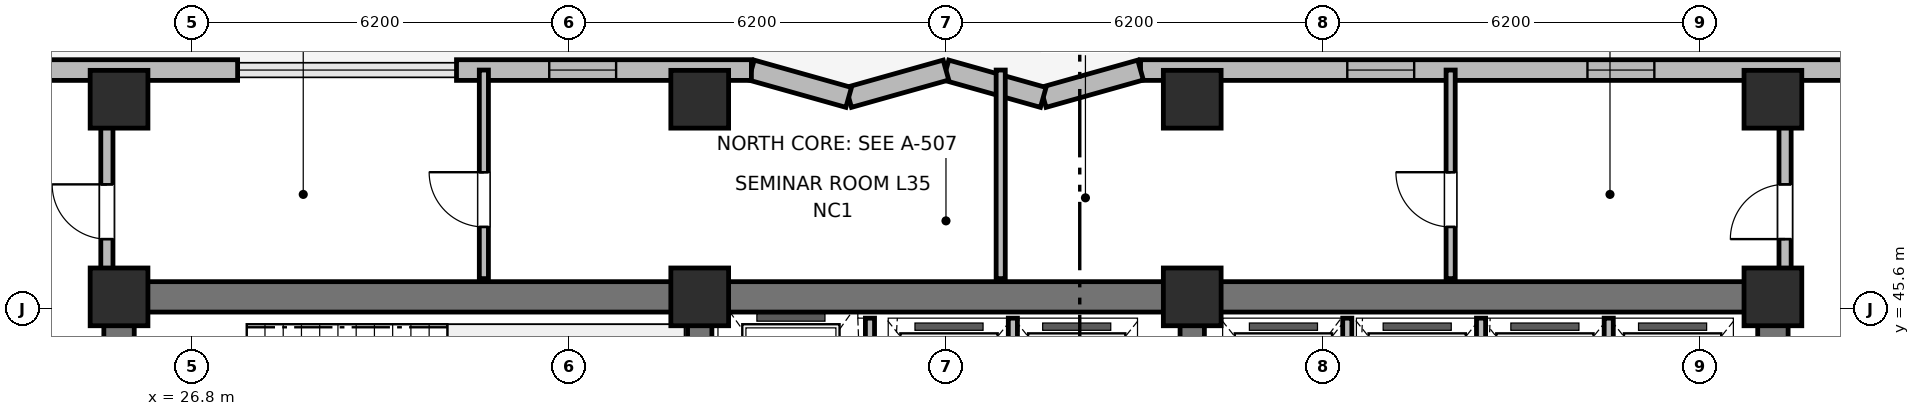
"""IFC4 building model, lengths in metres.
Left out: names, types, materials, properties, quantities, classifications, styles, units other than length and angle.
Written with IfcOpenShell. Run it as: python <this file> out.ifc"""

import sys

from ifc_helpers import new_model, si_unit, direction, frame, frame_2d, origin, origin_2d, place, context, subcontext, project, spatial, rectangle, extrude, element, fill, save


model = new_model("IFC4")
c1 = context("Model", 3, precision=1e-05, world=origin(), true_north=direction((0.0, 1.0)))
c2 = subcontext(c1, "Body", "Model", "MODEL_VIEW")
j1 = project(units=[si_unit("LENGTHUNIT", "METRE"), si_unit("PLANEANGLEUNIT", "RADIAN")], contexts=[c1])
p1 = place(None, origin())
s1 = spatial("IfcSite", under=j1, at=p1, CompositionType="ELEMENT")
p2 = place(p1, origin())
s2 = spatial("IfcBuilding", under=s1, at=p2, CompositionType="ELEMENT")
p3 = place(p2, frame((0.0, 0.0, 143.6)))
s3 = spatial("IfcBuildingStorey", under=s2, at=p3, CompositionType="ELEMENT", Elevation=143.6)
p4 = place(p3, frame((25.6, 45.8, 0.0), z_axis=(0.0, 0.0, 1.0), x_axis=(1.0, 0.0, 0.0)))
e1 = element("IfcWall", 1, at=p4, inside=s3, PredefinedType="SHEAR", context=c2, shape_type="SweptSolid", body=[
    extrude(rectangle(XDim=27.2, YDim=0.5, at=frame_2d((13.6, 0.0))), origin(), (0.0, 0.0, 1.0), 4.2),
])
for number, where, z_axis, x_axis in (
    (2, (25.6, 39.85, 0.0), (0.0, 0.0, 1.0), (0.0, 1.0, 0.0)),
    (3, (52.8, 39.85, 0.0), (0.0, 0.0, 1.0), (0.0, 1.0, 0.0)),
):
    element("IfcWall", number, at=place(p3, frame(where, z_axis=z_axis, x_axis=x_axis)), inside=s3, PredefinedType="SHEAR", context=c2, shape_type="SweptSolid", body=[
        extrude(rectangle(XDim=5.7, YDim=0.5, at=frame_2d((2.85, 0.0))), origin(), (0.0, 0.0, 1.0), 4.2),
    ])
for number, where, z_axis, x_axis in (
    (4, (35.15, 39.85, 0.0), (0.0, 0.0, 1.0), (0.0, 1.0, 0.0)),
    (5, (43.25, 39.85, 0.0), (0.0, 0.0, 1.0), (0.0, 1.0, 0.0)),
):
    element("IfcWall", number, at=place(p3, frame(where, z_axis=z_axis, x_axis=x_axis)), inside=s3, PredefinedType="SHEAR", context=c2, shape_type="SweptSolid", body=[
        extrude(rectangle(XDim=5.7, YDim=0.4, at=frame_2d((2.85, 0.0))), origin(), (0.0, 0.0, 1.0), 4.2),
    ])
for number, where, z_axis, x_axis in (
    (6, (25.6, 45.8, 0.0), (0.0, 0.0, 1.0), (1.0, 0.0, 0.0)),
    (7, (35.15, 45.8, 0.0), (0.0, 0.0, 1.0), (1.0, 0.0, 0.0)),
    (8, (43.25, 45.8, 0.0), (0.0, 0.0, 1.0), (1.0, 0.0, 0.0)),
    (9, (52.8, 45.8, 0.0), (0.0, 0.0, 1.0), (1.0, 0.0, 0.0)),
    (10, (25.6, 49.05, 0.0), (0.0, 0.0, 1.0), (1.0, 0.0, 0.0)),
    (11, (35.15, 49.05, 0.0), (0.0, 0.0, 1.0), (1.0, 0.0, 0.0)),
    (12, (43.25, 49.05, 0.0), (0.0, 0.0, 1.0), (1.0, 0.0, 0.0)),
    (13, (52.8, 49.05, 0.0), (0.0, 0.0, 1.0), (1.0, 0.0, 0.0)),
):
    element("IfcColumn", number, at=place(p3, frame(where, z_axis=z_axis, x_axis=x_axis)), inside=s3, PredefinedType="COLUMN", context=c2, shape_type="SweptSolid", body=[
        extrude(rectangle(XDim=0.95, YDim=0.95, at=origin_2d()), origin(), (0.0, 0.0, 1.0), 4.2),
    ])
p5 = place(p3, frame((58.2, 49.53, 0.0), z_axis=(0.0, 0.0, 1.0), x_axis=(-1.0, 0.0, 0.0)))
e14 = element("IfcWall", 14, at=p5, inside=s3, PredefinedType="SOLIDWALL", context=c2, shape_type="SweptSolid", body=[
    extrude(rectangle(XDim=15.8, YDim=0.34, at=frame_2d((7.9, 0.0))), origin(), (0.0, 0.0, 1.0), 3.22),
])
p6 = place(p5, frame((0.85, 0.0, 0.95)))
e15 = element("IfcOpeningElement", 15, at=p6, cuts=e14, PredefinedType="OPENING", context=c2, shape_type="SweptSolid", body=[
    extrude(rectangle(XDim=1.1, YDim=1.65, at=frame_2d((0.55, 0.825))), frame((0.0, 0.18, 0.0), z_axis=(0.0, -1.0, 0.0), x_axis=(1.0, 0.0, 0.0)), (0.0, 0.0, 1.0), 0.36),
])
p7 = place(p5, frame((7.35, 0.0, 0.95)))
e16 = element("IfcOpeningElement", 16, at=p7, cuts=e14, PredefinedType="OPENING", context=c2, shape_type="SweptSolid", body=[
    extrude(rectangle(XDim=1.1, YDim=1.65, at=frame_2d((0.55, 0.825))), frame((0.0, 0.18, 0.0), z_axis=(0.0, -1.0, 0.0), x_axis=(1.0, 0.0, 0.0)), (0.0, 0.0, 1.0), 0.36),
])
p8 = place(p5, frame((11.3, 0.0, 0.95)))
e17 = element("IfcOpeningElement", 17, at=p8, cuts=e14, PredefinedType="OPENING", context=c2, shape_type="SweptSolid", body=[
    extrude(rectangle(XDim=1.1, YDim=1.65, at=frame_2d((0.55, 0.825))), frame((0.0, 0.18, 0.0), z_axis=(0.0, -1.0, 0.0), x_axis=(1.0, 0.0, 0.0)), (0.0, 0.0, 1.0), 0.36),
])
p9 = place(p3, frame((42.4, 49.53, 0.0), z_axis=(0.0, 0.0, 1.0), x_axis=(-0.962652136636, -0.270741322725, 0.0)))
e18 = element("IfcWall", 18, at=p9, inside=s3, PredefinedType="SOLIDWALL", context=c2, shape_type="SweptSolid", body=[
    extrude(rectangle(XDim=1.662, YDim=0.34, at=frame_2d((0.831, 0.0))), origin(), (0.0, 0.0, 1.0), 3.22),
])
p10 = place(p3, frame((40.8, 49.08, 0.0), z_axis=(0.0, 0.0, 1.0), x_axis=(-0.962662902433, 0.270703040766, 0.0)))
e19 = element("IfcWall", 19, at=p10, inside=s3, PredefinedType="SOLIDWALL", context=c2, shape_type="SweptSolid", body=[
    extrude(rectangle(XDim=1.662, YDim=0.34, at=frame_2d((0.831, 0.0))), origin(), (0.0, 0.0, 1.0), 3.22),
])
p11 = place(p3, frame((39.2, 49.53, 0.0), z_axis=(0.0, 0.0, 1.0), x_axis=(-0.962652136636, -0.270741322725, 0.0)))
e20 = element("IfcWall", 20, at=p11, inside=s3, PredefinedType="SOLIDWALL", context=c2, shape_type="SweptSolid", body=[
    extrude(rectangle(XDim=1.662, YDim=0.34, at=frame_2d((0.831, 0.0))), origin(), (0.0, 0.0, 1.0), 3.22),
])
p12 = place(p3, frame((37.6, 49.08, 0.0), z_axis=(0.0, 0.0, 1.0), x_axis=(-0.962662902433, 0.270703040766, 0.0)))
e21 = element("IfcWall", 21, at=p12, inside=s3, PredefinedType="SOLIDWALL", context=c2, shape_type="SweptSolid", body=[
    extrude(rectangle(XDim=1.662, YDim=0.34, at=frame_2d((0.831, 0.0))), origin(), (0.0, 0.0, 1.0), 3.22),
])
p13 = place(p3, frame((36.0, 49.53, 0.0), z_axis=(0.0, 0.0, 1.0), x_axis=(-1.0, 0.0, 0.0)))
e22 = element("IfcWall", 22, at=p13, inside=s3, PredefinedType="SOLIDWALL", context=c2, shape_type="SweptSolid", body=[
    extrude(rectangle(XDim=4.85, YDim=0.34, at=frame_2d((2.425, 0.0))), origin(), (0.0, 0.0, 1.0), 3.22),
])
p14 = place(p13, frame((2.225, 0.0, 0.95)))
e23 = element("IfcOpeningElement", 23, at=p14, cuts=e22, PredefinedType="OPENING", context=c2, shape_type="SweptSolid", body=[
    extrude(rectangle(XDim=1.1, YDim=1.65, at=frame_2d((0.55, 0.825))), frame((0.0, 0.18, 0.0), z_axis=(0.0, -1.0, 0.0), x_axis=(1.0, 0.0, 0.0)), (0.0, 0.0, 1.0), 0.36),
])
p15 = place(p3, frame((27.55, 49.53, 0.0), z_axis=(0.0, 0.0, 1.0), x_axis=(-1.0, 0.0, 0.0)))
e24 = element("IfcWall", 24, at=p15, inside=s3, PredefinedType="SOLIDWALL", context=c2, shape_type="SweptSolid", body=[
    extrude(rectangle(XDim=7.35, YDim=0.34, at=frame_2d((3.675, 0.0))), origin(), (0.0, 0.0, 1.0), 3.22),
])
p16 = place(p15, frame((5.337, 0.0, 0.95)))
e25 = element("IfcOpeningElement", 25, at=p16, cuts=e24, PredefinedType="OPENING", context=c2, shape_type="SweptSolid", body=[
    extrude(rectangle(XDim=1.1, YDim=1.65, at=frame_2d((0.55, 0.825))), frame((0.0, 0.18, 0.0), z_axis=(0.0, -1.0, 0.0), x_axis=(1.0, 0.0, 0.0)), (0.0, 0.0, 1.0), 0.36),
])
p17 = place(p3, frame((37.95, 42.6, 0.0), z_axis=(0.0, 0.0, 1.0), x_axis=(0.0, 1.0, 0.0)))
e26 = element("IfcWall", 26, at=p17, inside=s3, PredefinedType="PARTITIONING", context=c2, shape_type="SweptSolid", body=[
    extrude(rectangle(XDim=2.85, YDim=0.15, at=frame_2d((1.425, 0.0))), origin(), (0.0, 0.0, 1.0), 3.05),
])
for number, where, z_axis, x_axis in (
    (27, (40.3, 42.65, 0.0), (0.0, 0.0, 1.0), (0.0, 1.0, 0.0)),
    (28, (45.8, 42.65, 0.0), (0.0, 0.0, 1.0), (0.0, 1.0, 0.0)),
    (29, (48.0, 42.65, 0.0), (0.0, 0.0, 1.0), (0.0, 1.0, 0.0)),
    (30, (50.1, 42.65, 0.0), (0.0, 0.0, 1.0), (0.0, 1.0, 0.0)),
):
    element("IfcWall", number, at=place(p3, frame(where, z_axis=z_axis, x_axis=x_axis)), inside=s3, PredefinedType="PARTITIONING", context=c2, shape_type="SweptSolid", body=[
        extrude(rectangle(XDim=2.8, YDim=0.15, at=frame_2d((1.4, 0.0))), origin(), (0.0, 0.0, 1.0), 3.05),
    ])
p18 = place(p3, frame((31.6, 46.1, 0.0), z_axis=(0.0, 0.0, 1.0), x_axis=(0.0, 1.0, 0.0)))
e31 = element("IfcWall", 31, at=p18, inside=s3, PredefinedType="PARTITIONING", context=c2, shape_type="SweptSolid", body=[
    extrude(rectangle(XDim=3.43, YDim=0.15, at=frame_2d((1.715, 0.0))), origin(), (0.0, 0.0, 1.0), 3.05),
])
p19 = place(p18, frame((0.85, 0.0, 0.0)))
e32 = element("IfcOpeningElement", 32, at=p19, cuts=e31, PredefinedType="OPENING", context=c2, shape_type="SweptSolid", body=[
    extrude(rectangle(XDim=0.9, YDim=2.1, at=frame_2d((0.45, 1.05))), frame((0.0, 0.085, 0.0), z_axis=(0.0, -1.0, 0.0), x_axis=(1.0, 0.0, 0.0)), (0.0, 0.0, 1.0), 0.17),
])
p20 = place(p3, frame((40.1, 46.1, 0.0), z_axis=(0.0, 0.0, 1.0), x_axis=(0.0, 1.0, 0.0)))
e33 = element("IfcWall", 33, at=p20, inside=s3, PredefinedType="PARTITIONING", context=c2, shape_type="SweptSolid", body=[
    extrude(rectangle(XDim=3.43, YDim=0.15, at=frame_2d((1.715, 0.0))), origin(), (0.0, 0.0, 1.0), 3.05),
])
p21 = place(p3, frame((47.5, 46.1, 0.0), z_axis=(0.0, 0.0, 1.0), x_axis=(0.0, 1.0, 0.0)))
e34 = element("IfcWall", 34, at=p21, inside=s3, PredefinedType="PARTITIONING", context=c2, shape_type="SweptSolid", body=[
    extrude(rectangle(XDim=3.43, YDim=0.15, at=frame_2d((1.715, 0.0))), origin(), (0.0, 0.0, 1.0), 3.05),
])
p22 = place(p21, frame((0.85, 0.0, 0.0)))
e35 = element("IfcOpeningElement", 35, at=p22, cuts=e34, PredefinedType="OPENING", context=c2, shape_type="SweptSolid", body=[
    extrude(rectangle(XDim=0.9, YDim=2.1, at=frame_2d((0.45, 1.05))), frame((0.0, 0.085, 0.0), z_axis=(0.0, -1.0, 0.0), x_axis=(1.0, 0.0, 0.0)), (0.0, 0.0, 1.0), 0.17),
])
p23 = place(p3, frame((25.4, 46.1, 0.0), z_axis=(0.0, 0.0, 1.0), x_axis=(0.0, 1.0, 0.0)))
e36 = element("IfcWall", 36, at=p23, inside=s3, PredefinedType="PARTITIONING", context=c2, shape_type="SweptSolid", body=[
    extrude(rectangle(XDim=2.78, YDim=0.2, at=frame_2d((1.39, 0.0))), origin(), (0.0, 0.0, 1.0), 3.05),
])
p24 = place(p23, frame((0.65, 0.0, 0.0)))
e37 = element("IfcOpeningElement", 37, at=p24, cuts=e36, PredefinedType="OPENING", context=c2, shape_type="SweptSolid", body=[
    extrude(rectangle(XDim=0.9, YDim=2.1, at=frame_2d((0.45, 1.05))), frame((0.0, 0.11, 0.0), z_axis=(0.0, -1.0, 0.0), x_axis=(1.0, 0.0, 0.0)), (0.0, 0.0, 1.0), 0.22),
])
p25 = place(p3, frame((53.0, 46.1, 0.0), z_axis=(0.0, 0.0, 1.0), x_axis=(0.0, 1.0, 0.0)))
e38 = element("IfcWall", 38, at=p25, inside=s3, PredefinedType="PARTITIONING", context=c2, shape_type="SweptSolid", body=[
    extrude(rectangle(XDim=2.78, YDim=0.2, at=frame_2d((1.39, 0.0))), origin(), (0.0, 0.0, 1.0), 3.05),
])
p26 = place(p25, frame((0.65, 0.0, 0.0)))
e39 = element("IfcOpeningElement", 39, at=p26, cuts=e38, PredefinedType="OPENING", context=c2, shape_type="SweptSolid", body=[
    extrude(rectangle(XDim=0.9, YDim=2.1, at=frame_2d((0.45, 1.05))), frame((0.0, 0.11, 0.0), z_axis=(0.0, -1.0, 0.0), x_axis=(1.0, 0.0, 0.0)), (0.0, 0.0, 1.0), 0.22),
])
p27 = place(p7, origin())
e40 = element("IfcWindow", 40, at=p27, inside=s3, PartitioningType="SINGLE_PANEL", PredefinedType="WINDOW", context=c2, shape_type="SweptSolid", body=[
    extrude(rectangle(XDim=1.1, YDim=1.65, at=frame_2d((0.55, 0.825))), frame((0.0, 0.03, 0.0), z_axis=(0.0, -1.0, 0.0), x_axis=(1.0, 0.0, 0.0)), (0.0, 0.0, 1.0), 0.06),
])
fill(e16, e40)
p28 = place(p8, origin())
e41 = element("IfcWindow", 41, at=p28, inside=s3, PartitioningType="SINGLE_PANEL", PredefinedType="WINDOW", context=c2, shape_type="SweptSolid", body=[
    extrude(rectangle(XDim=1.1, YDim=1.65, at=frame_2d((0.55, 0.825))), frame((0.0, 0.03, 0.0), z_axis=(0.0, -1.0, 0.0), x_axis=(1.0, 0.0, 0.0)), (0.0, 0.0, 1.0), 0.06),
])
fill(e17, e41)
p29 = place(p14, origin())
e42 = element("IfcWindow", 42, at=p29, inside=s3, PartitioningType="SINGLE_PANEL", PredefinedType="WINDOW", context=c2, shape_type="SweptSolid", body=[
    extrude(rectangle(XDim=1.1, YDim=1.65, at=frame_2d((0.55, 0.825))), frame((0.0, 0.03, 0.0), z_axis=(0.0, -1.0, 0.0), x_axis=(1.0, 0.0, 0.0)), (0.0, 0.0, 1.0), 0.06),
])
fill(e23, e42)
p30 = place(p19, origin())
e43 = element("IfcDoor", 43, at=p30, inside=s3, OperationType="SINGLE_SWING_RIGHT", PredefinedType="DOOR", context=c2, shape_type="SweptSolid", body=[
    extrude(rectangle(XDim=0.9, YDim=2.1, at=frame_2d((0.45, 1.05))), frame((0.0, 0.025, 0.0), z_axis=(0.0, -1.0, 0.0), x_axis=(1.0, 0.0, 0.0)), (0.0, 0.0, 1.0), 0.05),
])
fill(e32, e43)
p31 = place(p22, origin())
e44 = element("IfcDoor", 44, at=p31, inside=s3, OperationType="SINGLE_SWING_RIGHT", PredefinedType="DOOR", context=c2, shape_type="SweptSolid", body=[
    extrude(rectangle(XDim=0.9, YDim=2.1, at=frame_2d((0.45, 1.05))), frame((0.0, 0.025, 0.0), z_axis=(0.0, -1.0, 0.0), x_axis=(1.0, 0.0, 0.0)), (0.0, 0.0, 1.0), 0.05),
])
fill(e35, e44)
p32 = place(p24, origin())
e45 = element("IfcDoor", 45, at=p32, inside=s3, OperationType="SINGLE_SWING_RIGHT", PredefinedType="DOOR", context=c2, shape_type="SweptSolid", body=[
    extrude(rectangle(XDim=0.9, YDim=2.1, at=frame_2d((0.45, 1.05))), frame((0.0, 0.025, 0.0), z_axis=(0.0, -1.0, 0.0), x_axis=(1.0, 0.0, 0.0)), (0.0, 0.0, 1.0), 0.05),
])
fill(e37, e45)
p33 = place(p26, origin())
e46 = element("IfcDoor", 46, at=p33, inside=s3, OperationType="SINGLE_SWING_LEFT", PredefinedType="DOOR", context=c2, shape_type="SweptSolid", body=[
    extrude(rectangle(XDim=0.9, YDim=2.1, at=frame_2d((0.45, 1.05))), frame((0.0, 0.025, 0.0), z_axis=(0.0, -1.0, 0.0), x_axis=(1.0, 0.0, 0.0)), (0.0, 0.0, 1.0), 0.05),
])
fill(e39, e46)
save(model, sys.argv[1])
